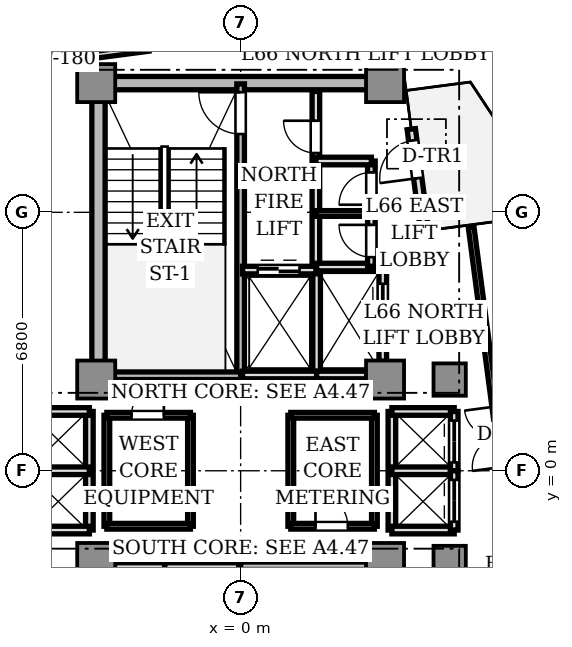
"""IFC4 building model, lengths in metres.
Left out: names, types, materials, properties, quantities, classifications, styles, units other than length and angle.
Written with IfcOpenShell. Run it as: python <this file> out.ifc"""

import sys

from ifc_helpers import new_model, si_unit, direction, frame, frame_2d, origin, origin_2d, place, context, subcontext, project, spatial, rectangle, extrude, source, transform, mapped, element, fill, save


model = new_model("IFC4")
c1 = context("Model", 3, precision=1e-05, world=origin(), true_north=direction((0.0, 1.0)))
c2 = subcontext(c1, "Body", "Model", "MODEL_VIEW")
j1 = project(units=[si_unit("LENGTHUNIT", "METRE"), si_unit("PLANEANGLEUNIT", "RADIAN")], contexts=[c1])
p1 = place(None, origin())
s1 = spatial("IfcSite", under=j1, at=p1, CompositionType="ELEMENT")
p2 = place(p1, origin())
s2 = spatial("IfcBuilding", under=s1, at=p2, CompositionType="ELEMENT")
p3 = place(p2, frame((0.0, 0.0, 237.8)))
s3 = spatial("IfcBuildingStorey", under=s2, at=p3, CompositionType="ELEMENT", Elevation=237.8)
p4 = place(p3, frame((-3.55, 10.2, 0.0), z_axis=(0.0, 0.0, 1.0), x_axis=(1.0, 0.0, 0.0)))
e1 = element("IfcWall", 1, at=p4, inside=s3, PredefinedType="SHEAR", context=c2, shape_type="SweptSolid", body=[
    extrude(rectangle(XDim=7.1, YDim=0.35, at=frame_2d((3.55, 0.0))), origin(), (0.0, 0.0, 1.0), 3.11),
])
p5 = place(p3, frame((-3.74, 2.85, 0.0), z_axis=(0.0, 0.0, 1.0), x_axis=(0.0, 1.0, 0.0)))
e2 = element("IfcWall", 2, at=p5, inside=s3, PredefinedType="SHEAR", context=c2, shape_type="SweptSolid", body=[
    extrude(rectangle(XDim=6.9, YDim=0.35, at=frame_2d((3.45, 0.0))), origin(), (0.0, 0.0, 1.0), 3.11),
])
m1 = source(origin(), c2, "Body", "SweptSolid", [
    extrude(rectangle(XDim=1.0, YDim=1.0, at=origin_2d()), origin(), (0.0, 0.0, 1.0), 3.11),
])
for number, where, z_axis, x_axis in (
    (3, (-3.8, 2.4, 0.0), (0.0, 0.0, 1.0), (1.0, 0.0, 0.0)),
    (4, (3.8, 2.4, 0.0), (0.0, 0.0, 1.0), (1.0, 0.0, 0.0)),
    (5, (-3.8, 10.2, 0.0), (0.0, 0.0, 1.0), (1.0, 0.0, 0.0)),
    (6, (3.8, 10.2, 0.0), (0.0, 0.0, 1.0), (1.0, 0.0, 0.0)),
    (7, (-3.8, -2.4, 0.0), (0.0, 0.0, 1.0), (1.0, 0.0, 0.0)),
    (8, (3.8, -2.4, 0.0), (0.0, 0.0, 1.0), (1.0, 0.0, 0.0)),
):
    element("IfcColumn", number, at=place(p3, frame(where, z_axis=z_axis, x_axis=x_axis)), inside=s3, PredefinedType="COLUMN", context=c2, shape_type="MappedRepresentation", body=[
        mapped(m1, transform((0.0, 0.0, 0.0), scale=1.0)),
    ])
m2 = source(origin(), c2, "Body", "SweptSolid", [
    extrude(rectangle(XDim=0.85, YDim=0.85, at=origin_2d()), origin(), (0.0, 0.0, 1.0), 3.11),
])
for number, where, z_axis, x_axis in (
    (9, (5.5, 2.4, 0.0), (0.0, 0.0, 1.0), (1.0, 0.0, 0.0)),
    (10, (5.5, -2.4, 0.0), (0.0, 0.0, 1.0), (1.0, 0.0, 0.0)),
):
    element("IfcColumn", number, at=place(p3, frame(where, z_axis=z_axis, x_axis=x_axis)), inside=s3, PredefinedType="COLUMN", context=c2, shape_type="MappedRepresentation", body=[
        mapped(m2, transform((0.0, 0.0, 0.0), scale=1.0)),
    ])
p6 = place(p3, frame((4.843, 6.311, 0.0), z_axis=(0.0, 0.0, 1.0), x_axis=(-0.130564442062, 0.991439824936, 0.0)))
e11 = element("IfcWall", 11, at=p6, inside=s3, PredefinedType="STANDARD", context=c2, shape_type="SweptSolid", body=[
    extrude(rectangle(XDim=2.7, YDim=0.22, at=frame_2d((1.35, 0.0))), origin(), (0.0, 0.0, 1.0), 3.11),
])
p7 = place(p6, frame((1.4, 0.0, 0.0)))
e12 = element("IfcOpeningElement", 12, at=p7, cuts=e11, PredefinedType="OPENING", context=c2, shape_type="SweptSolid", body=[
    extrude(rectangle(XDim=1.0, YDim=2.2, at=frame_2d((0.5, 1.1))), frame((0.0, 0.12, 0.0), z_axis=(0.0, -1.0, 0.0), x_axis=(1.0, 0.0, 0.0)), (0.0, 0.0, 1.0), 0.24),
])
p8 = place(p3, frame((0.0, 2.5, 0.0), z_axis=(0.0, 0.0, 1.0), x_axis=(0.0, 1.0, 0.0)))
e13 = element("IfcWall", 13, at=p8, inside=s3, PredefinedType="SOLIDWALL", context=c2, shape_type="SweptSolid", body=[
    extrude(rectangle(XDim=7.68, YDim=0.2, at=frame_2d((3.84, 0.0))), origin(), (0.0, 0.0, 1.0), 3.11),
])
p9 = place(p8, frame((6.36, 0.0, 0.0)))
e14 = element("IfcOpeningElement", 14, at=p9, cuts=e13, PredefinedType="OPENING", context=c2, shape_type="SweptSolid", body=[
    extrude(rectangle(XDim=1.1, YDim=2.15, at=frame_2d((0.55, 1.075))), frame((0.0, 0.11, 0.0), z_axis=(0.0, -1.0, 0.0), x_axis=(1.0, 0.0, 0.0)), (0.0, 0.0, 1.0), 0.22),
])
p10 = place(p3, frame((-3.72, 2.5, 0.0), z_axis=(0.0, 0.0, 1.0), x_axis=(1.0, 0.0, 0.0)))
e15 = element("IfcWall", 15, at=p10, inside=s3, PredefinedType="SOLIDWALL", context=c2, shape_type="SweptSolid", body=[
    extrude(rectangle(XDim=3.72, YDim=0.2, at=frame_2d((1.86, 0.0))), origin(), (0.0, 0.0, 1.0), 3.11),
])
p11 = place(p3, frame((0.0, -10.18, 0.0), z_axis=(0.0, 0.0, 1.0), x_axis=(0.0, 1.0, 0.0)))
e16 = element("IfcWall", 16, at=p11, inside=s3, PredefinedType="SOLIDWALL", context=c2, shape_type="SweptSolid", body=[
    extrude(rectangle(XDim=7.68, YDim=0.2, at=frame_2d((3.84, 0.0))), origin(), (0.0, 0.0, 1.0), 3.11),
])
p12 = place(p11, frame((0.28, 0.0, 0.0)))
e17 = element("IfcOpeningElement", 17, at=p12, cuts=e16, PredefinedType="OPENING", context=c2, shape_type="SweptSolid", body=[
    extrude(rectangle(XDim=1.1, YDim=2.15, at=frame_2d((0.55, 1.075))), frame((0.0, 0.11, 0.0), z_axis=(0.0, -1.0, 0.0), x_axis=(1.0, 0.0, 0.0)), (0.0, 0.0, 1.0), 0.22),
])
p13 = place(p3, frame((0.0, -2.5, 0.0), z_axis=(0.0, 0.0, 1.0), x_axis=(1.0, 0.0, 0.0)))
e18 = element("IfcWall", 18, at=p13, inside=s3, PredefinedType="SOLIDWALL", context=c2, shape_type="SweptSolid", body=[
    extrude(rectangle(XDim=3.72, YDim=0.2, at=frame_2d((1.86, 0.0))), origin(), (0.0, 0.0, 1.0), 3.11),
])
p14 = place(p3, frame((1.98, 5.32, 0.0), z_axis=(0.0, 0.0, 1.0), x_axis=(0.0, 1.0, 0.0)))
e19 = element("IfcWall", 19, at=p14, inside=s3, PredefinedType="SOLIDWALL", context=c2, shape_type="SweptSolid", body=[
    extrude(rectangle(XDim=4.66, YDim=0.2, at=frame_2d((2.33, 0.0))), origin(), (0.0, 0.0, 1.0), 2.66),
])
p15 = place(p14, frame((3.04, 0.0, 0.0)))
e20 = element("IfcOpeningElement", 20, at=p15, cuts=e19, PredefinedType="OPENING", context=c2, shape_type="SweptSolid", body=[
    extrude(rectangle(XDim=0.85, YDim=2.1, at=frame_2d((0.425, 1.05))), frame((0.0, 0.11, 0.0), z_axis=(0.0, -1.0, 0.0), x_axis=(1.0, 0.0, 0.0)), (0.0, 0.0, 1.0), 0.22),
])
p16 = place(p3, frame((2.0, 2.5, 0.0), z_axis=(0.0, 0.0, 1.0), x_axis=(0.0, 1.0, 0.0)))
e21 = element("IfcWall", 21, at=p16, inside=s3, PredefinedType="SOLIDWALL", context=c2, shape_type="SweptSolid", body=[
    extrude(rectangle(XDim=2.78, YDim=0.2, at=frame_2d((1.39, 0.0))), origin(), (0.0, 0.0, 1.0), 2.66),
])
p17 = place(p3, frame((0.05, 2.52, 0.0), z_axis=(0.0, 0.0, 1.0), x_axis=(1.0, 0.0, 0.0)))
e22 = element("IfcWall", 22, at=p17, inside=s3, PredefinedType="SOLIDWALL", context=c2, shape_type="SweptSolid", body=[
    extrude(rectangle(XDim=1.95, YDim=0.2, at=frame_2d((0.975, 0.0))), origin(), (0.0, 0.0, 1.0), 2.66),
])
p18 = place(p3, frame((0.05, 5.28, 0.0), z_axis=(0.0, 0.0, 1.0), x_axis=(1.0, 0.0, 0.0)))
e23 = element("IfcWall", 23, at=p18, inside=s3, PredefinedType="SOLIDWALL", context=c2, shape_type="SweptSolid", body=[
    extrude(rectangle(XDim=1.93, YDim=0.2, at=frame_2d((0.965, 0.0))), origin(), (0.0, 0.0, 1.0), 2.66),
])
p19 = place(p18, frame((0.4, 0.0, 0.0)))
e24 = element("IfcOpeningElement", 24, at=p19, cuts=e23, PredefinedType="OPENING", context=c2, shape_type="SweptSolid", body=[
    extrude(rectangle(XDim=1.1, YDim=2.2, at=frame_2d((0.55, 1.1))), frame((0.0, 0.11, 0.0), z_axis=(0.0, -1.0, 0.0), x_axis=(1.0, 0.0, 0.0)), (0.0, 0.0, 1.0), 0.22),
])
p20 = place(p3, frame((-2.0, -5.28, 0.0), z_axis=(0.0, 0.0, 1.0), x_axis=(0.0, 1.0, 0.0)))
e25 = element("IfcWall", 25, at=p20, inside=s3, PredefinedType="SOLIDWALL", context=c2, shape_type="SweptSolid", body=[
    extrude(rectangle(XDim=2.78, YDim=0.2, at=frame_2d((1.39, 0.0))), origin(), (0.0, 0.0, 1.0), 2.66),
])
p21 = place(p3, frame((-2.0, -2.52, 0.0), z_axis=(0.0, 0.0, 1.0), x_axis=(1.0, 0.0, 0.0)))
e26 = element("IfcWall", 26, at=p21, inside=s3, PredefinedType="SOLIDWALL", context=c2, shape_type="SweptSolid", body=[
    extrude(rectangle(XDim=1.95, YDim=0.2, at=frame_2d((0.975, 0.0))), origin(), (0.0, 0.0, 1.0), 2.66),
])
p22 = place(p3, frame((2.0, 2.52, 0.0), z_axis=(0.0, 0.0, 1.0), x_axis=(1.0, 0.0, 0.0)))
e27 = element("IfcWall", 27, at=p22, inside=s3, PredefinedType="SOLIDWALL", context=c2, shape_type="SweptSolid", body=[
    extrude(rectangle(XDim=1.32, YDim=0.2, at=frame_2d((0.66, 0.0))), origin(), (0.0, 0.0, 1.0), 2.66),
])
p23 = place(p3, frame((2.0, 5.36, 0.0), z_axis=(0.0, 0.0, 1.0), x_axis=(1.0, 0.0, 0.0)))
e28 = element("IfcWall", 28, at=p23, inside=s3, PredefinedType="SOLIDWALL", context=c2, shape_type="SweptSolid", body=[
    extrude(rectangle(XDim=1.74, YDim=0.2, at=frame_2d((0.87, 0.0))), origin(), (0.0, 0.0, 1.0), 2.66),
])
p24 = place(p3, frame((3.74, 2.88, 0.0), z_axis=(0.0, 0.0, 1.0), x_axis=(0.0, 1.0, 0.0)))
e29 = element("IfcWall", 29, at=p24, inside=s3, PredefinedType="SOLIDWALL", context=c2, shape_type="SweptSolid", body=[
    extrude(rectangle(XDim=2.48, YDim=0.2, at=frame_2d((1.24, 0.0))), origin(), (0.0, 0.0, 1.0), 2.66),
])
p25 = place(p24, frame((0.84, 0.0, 0.0)))
e30 = element("IfcOpeningElement", 30, at=p25, cuts=e29, PredefinedType="OPENING", context=c2, shape_type="SweptSolid", body=[
    extrude(rectangle(XDim=1.2, YDim=2.2, at=frame_2d((0.6, 1.1))), frame((0.0, 0.11, 0.0), z_axis=(0.0, -1.0, 0.0), x_axis=(1.0, 0.0, 0.0)), (0.0, 0.0, 1.0), 0.22),
])
p26 = place(p3, frame((-3.32, -2.52, 0.0), z_axis=(0.0, 0.0, 1.0), x_axis=(1.0, 0.0, 0.0)))
e31 = element("IfcWall", 31, at=p26, inside=s3, PredefinedType="SOLIDWALL", context=c2, shape_type="SweptSolid", body=[
    extrude(rectangle(XDim=1.32, YDim=0.2, at=frame_2d((0.66, 0.0))), origin(), (0.0, 0.0, 1.0), 2.66),
])
p27 = place(p3, frame((3.98, -1.56, 0.0), z_axis=(0.0, 0.0, 1.0), x_axis=(0.0, 1.0, 0.0)))
e32 = element("IfcWall", 32, at=p27, inside=s3, PredefinedType="SOLIDWALL", context=c2, shape_type="SweptSolid", body=[
    extrude(rectangle(XDim=3.12, YDim=0.2, at=frame_2d((1.56, 0.0))), origin(), (0.0, 0.0, 1.0), 2.33),
])
for number, where, z_axis, x_axis in (
    (33, (3.98, 1.56, 0.0), (0.0, 0.0, 1.0), (1.0, 0.0, 0.0)),
    (34, (3.98, -1.56, 0.0), (0.0, 0.0, 1.0), (1.0, 0.0, 0.0)),
    (35, (3.98, 0.0, 0.0), (0.0, 0.0, 1.0), (1.0, 0.0, 0.0)),
):
    element("IfcWall", number, at=place(p3, frame(where, z_axis=z_axis, x_axis=x_axis)), inside=s3, PredefinedType="SOLIDWALL", context=c2, shape_type="SweptSolid", body=[
        extrude(rectangle(XDim=1.64, YDim=0.2, at=frame_2d((0.82, 0.0))), origin(), (0.0, 0.0, 1.0), 2.66),
    ])
p28 = place(p3, frame((5.62, 0.0, 0.0), z_axis=(0.0, 0.0, 1.0), x_axis=(0.0, 1.0, 0.0)))
e36 = element("IfcWall", 36, at=p28, inside=s3, PredefinedType="SOLIDWALL", context=c2, shape_type="SweptSolid", body=[
    extrude(rectangle(XDim=1.56, YDim=0.2, at=frame_2d((0.78, 0.0))), origin(), (0.0, 0.0, 1.0), 2.66),
])
p29 = place(p28, frame((0.22, 0.0, 0.0)))
e37 = element("IfcOpeningElement", 37, at=p29, cuts=e36, PredefinedType="OPENING", context=c2, shape_type="SweptSolid", body=[
    extrude(rectangle(XDim=1.1, YDim=2.2, at=frame_2d((0.55, 1.1))), frame((0.0, 0.11, 0.0), z_axis=(0.0, -1.0, 0.0), x_axis=(1.0, 0.0, 0.0)), (0.0, 0.0, 1.0), 0.22),
])
p30 = place(p3, frame((5.62, -1.56, 0.0), z_axis=(0.0, 0.0, 1.0), x_axis=(0.0, 1.0, 0.0)))
e38 = element("IfcWall", 38, at=p30, inside=s3, PredefinedType="SOLIDWALL", context=c2, shape_type="SweptSolid", body=[
    extrude(rectangle(XDim=1.56, YDim=0.2, at=frame_2d((0.78, 0.0))), origin(), (0.0, 0.0, 1.0), 2.66),
])
p31 = place(p30, frame((0.22, 0.0, 0.0)))
e39 = element("IfcOpeningElement", 39, at=p31, cuts=e38, PredefinedType="OPENING", context=c2, shape_type="SweptSolid", body=[
    extrude(rectangle(XDim=1.1, YDim=2.2, at=frame_2d((0.55, 1.1))), frame((0.0, 0.11, 0.0), z_axis=(0.0, -1.0, 0.0), x_axis=(1.0, 0.0, 0.0)), (0.0, 0.0, 1.0), 0.22),
])
p32 = place(p3, frame((-3.98, -1.56, 0.0), z_axis=(0.0, 0.0, 1.0), x_axis=(0.0, 1.0, 0.0)))
e40 = element("IfcWall", 40, at=p32, inside=s3, PredefinedType="SOLIDWALL", context=c2, shape_type="SweptSolid", body=[
    extrude(rectangle(XDim=3.12, YDim=0.2, at=frame_2d((1.56, 0.0))), origin(), (0.0, 0.0, 1.0), 2.33),
])
for number, where, z_axis, x_axis in (
    (41, (-5.62, 1.56, 0.0), (0.0, 0.0, 1.0), (1.0, 0.0, 0.0)),
    (42, (-5.62, -1.56, 0.0), (0.0, 0.0, 1.0), (1.0, 0.0, 0.0)),
    (43, (-5.62, 0.0, 0.0), (0.0, 0.0, 1.0), (1.0, 0.0, 0.0)),
):
    element("IfcWall", number, at=place(p3, frame(where, z_axis=z_axis, x_axis=x_axis)), inside=s3, PredefinedType="SOLIDWALL", context=c2, shape_type="SweptSolid", body=[
        extrude(rectangle(XDim=1.64, YDim=0.2, at=frame_2d((0.82, 0.0))), origin(), (0.0, 0.0, 1.0), 2.66),
    ])
p33 = place(p3, frame((3.44, 5.38, 0.0), z_axis=(0.0, 0.0, 1.0), x_axis=(0.0, 1.0, 0.0)))
e44 = element("IfcWall", 44, at=p33, inside=s3, PredefinedType="SOLIDWALL", context=c2, shape_type="SweptSolid", body=[
    extrude(rectangle(XDim=2.77, YDim=0.2, at=frame_2d((1.385, 0.0))), origin(), (0.0, 0.0, 1.0), 2.66),
])
p34 = place(p33, frame((0.24, 0.0, 0.0)))
e45 = element("IfcOpeningElement", 45, at=p34, cuts=e44, PredefinedType="OPENING", context=c2, shape_type="SweptSolid", body=[
    extrude(rectangle(XDim=0.85, YDim=2.1, at=frame_2d((0.425, 1.05))), frame((0.0, 0.11, 0.0), z_axis=(0.0, -1.0, 0.0), x_axis=(1.0, 0.0, 0.0)), (0.0, 0.0, 1.0), 0.22),
])
p35 = place(p33, frame((1.62, 0.0, 0.0)))
e46 = element("IfcOpeningElement", 46, at=p35, cuts=e44, PredefinedType="OPENING", context=c2, shape_type="SweptSolid", body=[
    extrude(rectangle(XDim=0.85, YDim=2.1, at=frame_2d((0.425, 1.05))), frame((0.0, 0.11, 0.0), z_axis=(0.0, -1.0, 0.0), x_axis=(1.0, 0.0, 0.0)), (0.0, 0.0, 1.0), 0.22),
])
p36 = place(p3, frame((1.98, 8.15, 0.0), z_axis=(0.0, 0.0, 1.0), x_axis=(1.0, 0.0, 0.0)))
e47 = element("IfcWall", 47, at=p36, inside=s3, PredefinedType="SOLIDWALL", context=c2, shape_type="SweptSolid", body=[
    extrude(rectangle(XDim=1.46, YDim=0.2, at=frame_2d((0.73, 0.0))), origin(), (0.0, 0.0, 1.0), 2.66),
])
p37 = place(p3, frame((1.98, 6.77, 0.0), z_axis=(0.0, 0.0, 1.0), x_axis=(1.0, 0.0, 0.0)))
e48 = element("IfcWall", 48, at=p37, inside=s3, PredefinedType="PARTITIONING", context=c2, shape_type="SweptSolid", body=[
    extrude(rectangle(XDim=1.46, YDim=0.15, at=frame_2d((0.73, 0.0))), origin(), (0.0, 0.0, 1.0), 2.66),
])
p38 = place(p3, frame((-1.32, -1.46, 0.0), z_axis=(0.0, 0.0, 1.0), x_axis=(0.0, 1.0, 0.0)))
e49 = element("IfcWall", 49, at=p38, inside=s3, PredefinedType="PARTITIONING", context=c2, shape_type="SweptSolid", body=[
    extrude(rectangle(XDim=2.92, YDim=0.15, at=frame_2d((1.46, 0.0))), origin(), (0.0, 0.0, 1.0), 2.66),
])
p39 = place(p3, frame((-3.52, -1.46, 0.0), z_axis=(0.0, 0.0, 1.0), x_axis=(0.0, 1.0, 0.0)))
e50 = element("IfcWall", 50, at=p39, inside=s3, PredefinedType="PARTITIONING", context=c2, shape_type="SweptSolid", body=[
    extrude(rectangle(XDim=2.92, YDim=0.15, at=frame_2d((1.46, 0.0))), origin(), (0.0, 0.0, 1.0), 2.33),
])
p40 = place(p3, frame((-3.52, 1.46, 0.0), z_axis=(0.0, 0.0, 1.0), x_axis=(1.0, 0.0, 0.0)))
e51 = element("IfcWall", 51, at=p40, inside=s3, PredefinedType="PARTITIONING", context=c2, shape_type="SweptSolid", body=[
    extrude(rectangle(XDim=2.2, YDim=0.15, at=frame_2d((1.1, 0.0))), origin(), (0.0, 0.0, 1.0), 2.66),
])
p41 = place(p40, frame((0.65, 0.0, 0.0)))
e52 = element("IfcOpeningElement", 52, at=p41, cuts=e51, PredefinedType="OPENING", context=c2, shape_type="SweptSolid", body=[
    extrude(rectangle(XDim=0.85, YDim=2.1, at=frame_2d((0.425, 1.05))), frame((0.0, 0.085, 0.0), z_axis=(0.0, -1.0, 0.0), x_axis=(1.0, 0.0, 0.0)), (0.0, 0.0, 1.0), 0.17),
])
p42 = place(p3, frame((-3.52, -1.46, 0.0), z_axis=(0.0, 0.0, 1.0), x_axis=(1.0, 0.0, 0.0)))
e53 = element("IfcWall", 53, at=p42, inside=s3, PredefinedType="PARTITIONING", context=c2, shape_type="SweptSolid", body=[
    extrude(rectangle(XDim=2.2, YDim=0.15, at=frame_2d((1.1, 0.0))), origin(), (0.0, 0.0, 1.0), 2.66),
])
p43 = place(p3, frame((1.32, -1.46, 0.0), z_axis=(0.0, 0.0, 1.0), x_axis=(0.0, 1.0, 0.0)))
e54 = element("IfcWall", 54, at=p43, inside=s3, PredefinedType="PARTITIONING", context=c2, shape_type="SweptSolid", body=[
    extrude(rectangle(XDim=2.92, YDim=0.15, at=frame_2d((1.46, 0.0))), origin(), (0.0, 0.0, 1.0), 2.66),
])
p44 = place(p3, frame((3.52, -1.46, 0.0), z_axis=(0.0, 0.0, 1.0), x_axis=(0.0, 1.0, 0.0)))
e55 = element("IfcWall", 55, at=p44, inside=s3, PredefinedType="PARTITIONING", context=c2, shape_type="SweptSolid", body=[
    extrude(rectangle(XDim=2.92, YDim=0.15, at=frame_2d((1.46, 0.0))), origin(), (0.0, 0.0, 1.0), 2.33),
])
p45 = place(p3, frame((1.32, 1.46, 0.0), z_axis=(0.0, 0.0, 1.0), x_axis=(1.0, 0.0, 0.0)))
e56 = element("IfcWall", 56, at=p45, inside=s3, PredefinedType="PARTITIONING", context=c2, shape_type="SweptSolid", body=[
    extrude(rectangle(XDim=2.2, YDim=0.15, at=frame_2d((1.1, 0.0))), origin(), (0.0, 0.0, 1.0), 2.66),
])
p46 = place(p3, frame((1.32, -1.46, 0.0), z_axis=(0.0, 0.0, 1.0), x_axis=(1.0, 0.0, 0.0)))
e57 = element("IfcWall", 57, at=p46, inside=s3, PredefinedType="PARTITIONING", context=c2, shape_type="SweptSolid", body=[
    extrude(rectangle(XDim=2.2, YDim=0.15, at=frame_2d((1.1, 0.0))), origin(), (0.0, 0.0, 1.0), 2.66),
])
p47 = place(p46, frame((0.65, 0.0, 0.0)))
e58 = element("IfcOpeningElement", 58, at=p47, cuts=e57, PredefinedType="OPENING", context=c2, shape_type="SweptSolid", body=[
    extrude(rectangle(XDim=0.85, YDim=2.1, at=frame_2d((0.425, 1.05))), frame((0.0, 0.085, 0.0), z_axis=(0.0, -1.0, 0.0), x_axis=(1.0, 0.0, 0.0)), (0.0, 0.0, 1.0), 0.17),
])
p48 = place(p3, frame((7.519, -4.633, 0.0), z_axis=(0.0, 0.0, 1.0), x_axis=(-0.130521347626, 0.991445499165, 0.0)))
e59 = element("IfcWall", 59, at=p48, inside=s3, PredefinedType="PARTITIONING", context=c2, shape_type="SweptSolid", body=[
    extrude(rectangle(XDim=11.15, YDim=0.15, at=frame_2d((5.575, 0.0))), origin(), (0.0, 0.0, 1.0), 2.66),
])
p49 = place(p48, frame((4.775, 0.0, 0.0)))
e60 = element("IfcOpeningElement", 60, at=p49, cuts=e59, PredefinedType="OPENING", context=c2, shape_type="SweptSolid", body=[
    extrude(rectangle(XDim=1.6, YDim=2.25, at=frame_2d((0.8, 1.125))), frame((0.0, 0.085, 0.0), z_axis=(0.0, -1.0, 0.0), x_axis=(1.0, 0.0, 0.0)), (0.0, 0.0, 1.0), 0.17),
])
p50 = place(p3, frame((-2.423, 11.129, 0.0), z_axis=(0.0, 0.0, 1.0), x_axis=(-0.991442792852, -0.130541903244, 0.0)))
e61 = element("IfcWall", 61, at=p50, inside=s3, PredefinedType="PARTITIONING", context=c2, shape_type="SweptSolid", body=[
    extrude(rectangle(XDim=4.625, YDim=0.18, at=frame_2d((2.312, 0.0))), origin(), (0.0, 0.0, 1.0), 2.66),
])
m3 = source(origin(), c2, "Body", "SweptSolid", [
    extrude(rectangle(XDim=1.0, YDim=0.05, at=origin_2d()), origin(), (0.0, 0.0, 1.0), 2.2),
])
p51 = place(p7, frame((0.5, 0.0, 0.0)))
e62 = element("IfcDoor", 62, at=p51, inside=s3, OperationType="SINGLE_SWING_LEFT", PredefinedType="DOOR", context=c2, shape_type="MappedRepresentation", body=[
    mapped(m3, transform((0.0, 0.0, 0.0), scale=1.0)),
])
fill(e12, e62)
m4 = source(origin(), c2, "Body", "SweptSolid", [
    extrude(rectangle(XDim=1.1, YDim=0.05, at=origin_2d()), origin(), (0.0, 0.0, 1.0), 2.15),
])
p52 = place(p9, frame((0.55, 0.0, 0.0)))
e63 = element("IfcDoor", 63, at=p52, inside=s3, OperationType="SINGLE_SWING_RIGHT", PredefinedType="DOOR", context=c2, shape_type="MappedRepresentation", body=[
    mapped(m4, transform((0.0, 0.0, 0.0), scale=1.0)),
])
fill(e14, e63)
m5 = source(origin(), c2, "Body", "SweptSolid", [
    extrude(rectangle(XDim=0.85, YDim=0.05, at=origin_2d()), origin(), (0.0, 0.0, 1.0), 2.1),
])
p53 = place(p15, frame((0.425, 0.0, 0.0)))
e64 = element("IfcDoor", 64, at=p53, inside=s3, OperationType="SINGLE_SWING_RIGHT", PredefinedType="DOOR", context=c2, shape_type="MappedRepresentation", body=[
    mapped(m5, transform((0.0, 0.0, 0.0), scale=1.0)),
])
fill(e20, e64)
m6 = source(origin(), c2, "Body", "SweptSolid", [
    extrude(rectangle(XDim=1.1, YDim=0.05, at=origin_2d()), origin(), (0.0, 0.0, 1.0), 2.2),
])
p54 = place(p19, frame((0.55, 0.0, 0.0)))
e65 = element("IfcDoor", 65, at=p54, inside=s3, OperationType="DOUBLE_DOOR_SLIDING", PredefinedType="DOOR", context=c2, shape_type="MappedRepresentation", body=[
    mapped(m6, transform((0.0, 0.0, 0.0), scale=1.0)),
])
fill(e24, e65)
m7 = source(origin(), c2, "Body", "SweptSolid", [
    extrude(rectangle(XDim=1.2, YDim=0.05, at=origin_2d()), origin(), (0.0, 0.0, 1.0), 2.2),
])
p55 = place(p25, frame((0.6, 0.0, 0.0)))
e66 = element("IfcDoor", 66, at=p55, inside=s3, OperationType="DOUBLE_DOOR_SLIDING", PredefinedType="DOOR", context=c2, shape_type="MappedRepresentation", body=[
    mapped(m7, transform((0.0, 0.0, 0.0), scale=1.0)),
])
fill(e30, e66)
p56 = place(p29, frame((0.55, 0.0, 0.0)))
e67 = element("IfcDoor", 67, at=p56, inside=s3, OperationType="DOUBLE_DOOR_SLIDING", PredefinedType="DOOR", context=c2, shape_type="MappedRepresentation", body=[
    mapped(m6, transform((0.0, 0.0, 0.0), scale=1.0)),
])
fill(e37, e67)
p57 = place(p31, frame((0.55, 0.0, 0.0)))
e68 = element("IfcDoor", 68, at=p57, inside=s3, OperationType="DOUBLE_DOOR_SLIDING", PredefinedType="DOOR", context=c2, shape_type="MappedRepresentation", body=[
    mapped(m6, transform((0.0, 0.0, 0.0), scale=1.0)),
])
fill(e39, e68)
p58 = place(p34, frame((0.425, 0.0, 0.0)))
e69 = element("IfcDoor", 69, at=p58, inside=s3, OperationType="SINGLE_SWING_RIGHT", PredefinedType="DOOR", context=c2, shape_type="MappedRepresentation", body=[
    mapped(m5, transform((0.0, 0.0, 0.0), scale=1.0)),
])
fill(e45, e69)
p59 = place(p35, frame((0.425, 0.0, 0.0)))
e70 = element("IfcDoor", 70, at=p59, inside=s3, OperationType="SINGLE_SWING_LEFT", PredefinedType="DOOR", context=c2, shape_type="MappedRepresentation", body=[
    mapped(m5, transform((0.0, 0.0, 0.0), scale=1.0)),
])
fill(e46, e70)
p60 = place(p41, frame((0.425, 0.0, 0.0)))
e71 = element("IfcDoor", 71, at=p60, inside=s3, OperationType="SINGLE_SWING_RIGHT", PredefinedType="DOOR", context=c2, shape_type="MappedRepresentation", body=[
    mapped(m5, transform((0.0, 0.0, 0.0), scale=1.0)),
])
fill(e52, e71)
p61 = place(p47, frame((0.425, 0.0, 0.0)))
e72 = element("IfcDoor", 72, at=p61, inside=s3, OperationType="SINGLE_SWING_LEFT", PredefinedType="DOOR", context=c2, shape_type="MappedRepresentation", body=[
    mapped(m5, transform((0.0, 0.0, 0.0), scale=1.0)),
])
fill(e58, e72)
save(model, sys.argv[1])
